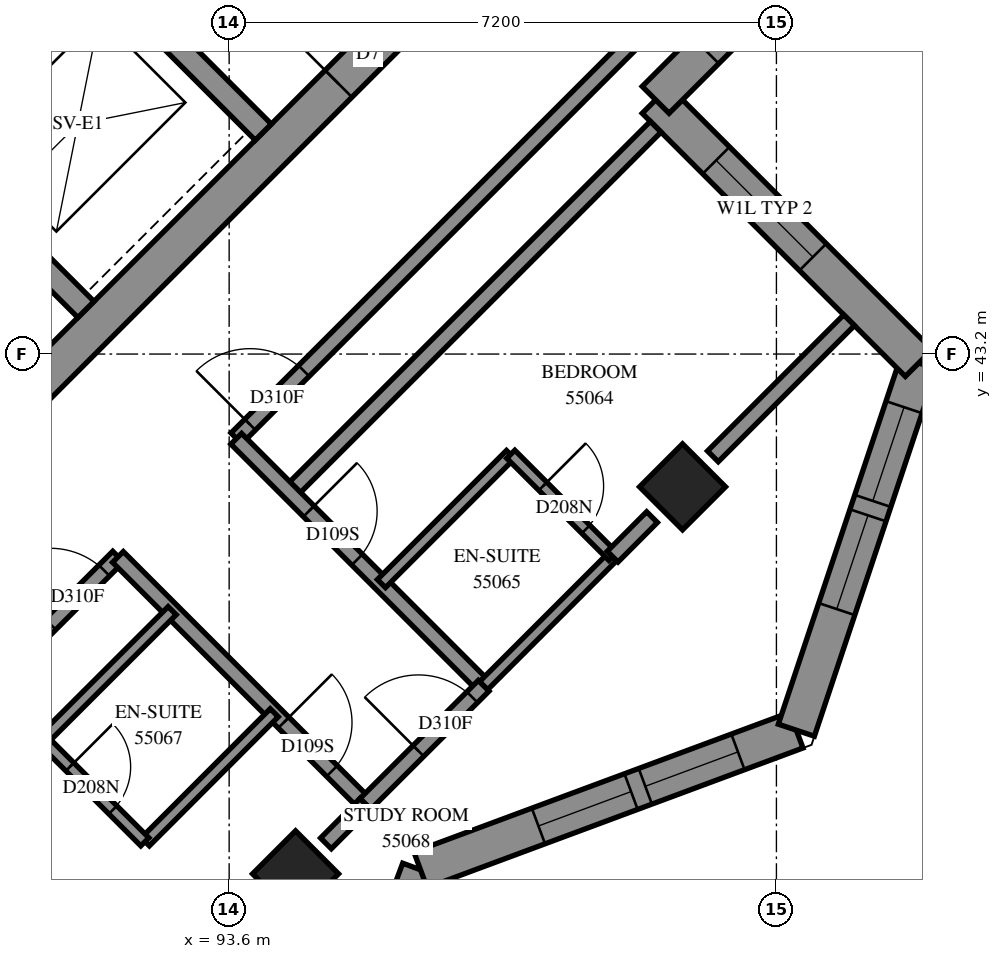
"""IFC4 building model, lengths in metres.
Left out: names, types, materials, properties, quantities, classifications, styles, units other than length and angle.
Written with IfcOpenShell. Run it as: python <this file> out.ifc"""

import sys

from ifc_helpers import new_model, si_unit, direction, frame, frame_2d, origin, origin_2d, place, context, subcontext, project, spatial, polyline, rectangle, outline, extrude, element, fill, save


model = new_model("IFC4")
c1 = context("Model", 3, precision=1e-05, world=origin(), true_north=direction((0.0, 1.0)))
c2 = subcontext(c1, "Body", "Model", "MODEL_VIEW")
j1 = project(units=[si_unit("LENGTHUNIT", "METRE"), si_unit("PLANEANGLEUNIT", "RADIAN")], contexts=[c1])
p1 = place(None, origin())
s1 = spatial("IfcSite", under=j1, at=p1, CompositionType="ELEMENT")
p2 = place(p1, origin())
s2 = spatial("IfcBuilding", under=s1, at=p2, CompositionType="ELEMENT")
p3 = place(p2, frame((0.0, 0.0, 203.2)))
s3 = spatial("IfcBuildingStorey", under=s2, at=p3, CompositionType="ELEMENT", Elevation=203.2)
for number, where, z_axis, x_axis in (
    (1, (99.565, 41.453, 0.0), (0.0, 0.0, 1.0), (0.707, -0.707, 0.0)),
    (2, (94.474, 36.362, 0.0), (0.0, 0.0, 1.0), (0.707, -0.707, 0.0)),
):
    element("IfcColumn", number, at=place(p3, frame(where, z_axis=z_axis, x_axis=x_axis)), inside=s3, PredefinedType="COLUMN", context=c2, shape_type="SweptSolid", body=[
        extrude(rectangle(XDim=0.8, YDim=0.8, at=origin_2d()), origin(), (0.0, 0.0, 1.0), 3.1),
    ])
p4 = place(p3, frame((87.013, 38.731, -0.3), z_axis=(0.0, 0.0, 1.0), x_axis=(0.7071067812, 0.7071067812, 0.0)))
e3 = element("IfcWall", 3, at=p4, inside=s3, PredefinedType="SHEAR", context=c2, shape_type="SweptSolid", body=[
    extrude(rectangle(XDim=14.4, YDim=0.5, at=frame_2d((7.2, 0.0))), origin(), (0.0, 0.0, 1.0), 2.7),
])
p5 = place(p4, frame((4.55, 0.0, 0.3)))
e4 = element("IfcOpeningElement", 4, at=p5, cuts=e3, PredefinedType="OPENING", context=c2, shape_type="SweptSolid", body=[
    extrude(rectangle(XDim=1.1, YDim=2.1, at=frame_2d((0.55, 1.05))), frame((0.0, 0.26, 0.0), z_axis=(0.0, -1.0, 0.0), x_axis=(1.0, 0.0, 0.0)), (0.0, 0.0, 1.0), 0.52),
])
p6 = place(p4, frame((11.35, 0.0, 0.3)))
e5 = element("IfcOpeningElement", 5, at=p6, cuts=e3, PredefinedType="OPENING", context=c2, shape_type="SweptSolid", body=[
    extrude(rectangle(XDim=1.1, YDim=2.1, at=frame_2d((0.55, 1.05))), frame((0.0, 0.26, 0.0), z_axis=(0.0, -1.0, 0.0), x_axis=(1.0, 0.0, 0.0)), (0.0, 0.0, 1.0), 0.52),
])
p7 = place(p3, frame((89.17, 46.332, 0.0), z_axis=(0.0, 0.0, 1.0), x_axis=(0.7071067812, 0.7071067812, 0.0)))
e6 = element("IfcWall", 6, at=p7, inside=s3, PredefinedType="SOLIDWALL", context=c2, shape_type="SweptSolid", body=[
    extrude(rectangle(XDim=3.3, YDim=0.3, at=frame_2d((1.65, 0.0))), origin(), (0.0, 0.0, 1.0), 3.1),
])
p8 = place(p3, frame((81.534, 53.969, 0.0), z_axis=(0.0, 0.0, 1.0), x_axis=(0.707103309, -0.7071102534, 0.0)))
e7 = element("IfcWall", 7, at=p8, inside=s3, PredefinedType="SOLIDWALL", context=c2, shape_type="SweptSolid", body=[
    extrude(rectangle(XDim=14.4, YDim=0.3, at=frame_2d((7.2, 0.0))), origin(), (0.0, 0.0, 1.0), 3.1),
])
p9 = place(p8, frame((1.25, 0.0, 0.0)))
e8 = element("IfcOpeningElement", 8, at=p9, cuts=e7, PredefinedType="OPENING", context=c2, shape_type="SweptSolid", body=[
    extrude(rectangle(XDim=1.1, YDim=2.1, at=frame_2d((0.55, 1.05))), frame((0.0, 0.16, 0.0), z_axis=(0.0, -1.0, 0.0), x_axis=(1.0, 0.0, 0.0)), (0.0, 0.0, 1.0), 0.32),
])
p10 = place(p8, frame((4.85, 0.0, 0.0)))
e9 = element("IfcOpeningElement", 9, at=p10, cuts=e7, PredefinedType="OPENING", context=c2, shape_type="SweptSolid", body=[
    extrude(rectangle(XDim=1.1, YDim=2.1, at=frame_2d((0.55, 1.05))), frame((0.0, 0.16, 0.0), z_axis=(0.0, -1.0, 0.0), x_axis=(1.0, 0.0, 0.0)), (0.0, 0.0, 1.0), 0.32),
])
p11 = place(p8, frame((8.45, 0.0, 0.0)))
e10 = element("IfcOpeningElement", 10, at=p11, cuts=e7, PredefinedType="OPENING", context=c2, shape_type="SweptSolid", body=[
    extrude(rectangle(XDim=1.1, YDim=2.1, at=frame_2d((0.55, 1.05))), frame((0.0, 0.16, 0.0), z_axis=(0.0, -1.0, 0.0), x_axis=(1.0, 0.0, 0.0)), (0.0, 0.0, 1.0), 0.32),
])
p12 = place(p8, frame((12.05, 0.0, 0.0)))
e11 = element("IfcOpeningElement", 11, at=p12, cuts=e7, PredefinedType="OPENING", context=c2, shape_type="SweptSolid", body=[
    extrude(rectangle(XDim=1.1, YDim=2.1, at=frame_2d((0.55, 1.05))), frame((0.0, 0.16, 0.0), z_axis=(0.0, -1.0, 0.0), x_axis=(1.0, 0.0, 0.0)), (0.0, 0.0, 1.0), 0.32),
])
p13 = place(p3, frame((88.958, 51.211, 0.0), z_axis=(0.0, 0.0, 1.0), x_axis=(0.7070998367, -0.7071137256, 0.0)))
e12 = element("IfcWall", 12, at=p13, inside=s3, PredefinedType="SOLIDWALL", context=c2, shape_type="SweptSolid", body=[
    extrude(rectangle(XDim=7.2, YDim=0.3, at=frame_2d((3.6, 0.0))), origin(), (0.0, 0.0, 1.0), 3.1),
])
p14 = place(p3, frame((94.281, 31.47, 0.0), z_axis=(0.0, 0.0, 1.0), x_axis=(0.3481903374, 0.9374238577, 0.0)))
e13 = element("IfcWall", 13, at=p14, inside=s3, PredefinedType="SOLIDWALL", context=c2, shape_type="SweptSolid", body=[
    extrude(outline(polyline([(-0.12, -0.25), (5.16, -0.25), (5.39, 0.25), (0.12, 0.25), (-0.12, -0.25)])), origin(), (0.0, 0.0, 1.0), 3.1),
])
p15 = place(p14, frame((1.512, 0.0, 0.45)))
e14 = element("IfcOpeningElement", 14, at=p15, cuts=e13, PredefinedType="OPENING", context=c2, shape_type="SweptSolid", body=[
    extrude(rectangle(XDim=1.3, YDim=2.5, at=frame_2d((0.65, 1.25))), frame((0.0, 0.26, 0.0), z_axis=(0.0, -1.0, 0.0), x_axis=(1.0, 0.0, 0.0)), (0.0, 0.0, 1.0), 0.52),
])
p16 = place(p14, frame((3.012, 0.0, 0.45)))
e15 = element("IfcOpeningElement", 15, at=p16, cuts=e13, PredefinedType="OPENING", context=c2, shape_type="SweptSolid", body=[
    extrude(rectangle(XDim=1.3, YDim=2.5, at=frame_2d((0.65, 1.25))), frame((0.0, 0.26, 0.0), z_axis=(0.0, -1.0, 0.0), x_axis=(1.0, 0.0, 0.0)), (0.0, 0.0, 1.0), 0.52),
])
p17 = place(p3, frame((96.118, 36.415, 0.0), z_axis=(0.0, 0.0, 1.0), x_axis=(0.9374238577, 0.3481903374, 0.0)))
e16 = element("IfcWall", 16, at=p17, inside=s3, PredefinedType="SOLIDWALL", context=c2, shape_type="SweptSolid", body=[
    extrude(outline(polyline([(0.115, -0.25), (5.395, -0.25), (5.155, 0.25), (-0.115, 0.25), (0.115, -0.25)])), origin(), (0.0, 0.0, 1.0), 3.1),
])
p18 = place(p17, frame((1.655, 0.0, 0.45)))
e17 = element("IfcOpeningElement", 17, at=p18, cuts=e16, PredefinedType="OPENING", context=c2, shape_type="SweptSolid", body=[
    extrude(rectangle(XDim=1.3, YDim=2.5, at=frame_2d((0.65, 1.25))), frame((0.0, 0.26, 0.0), z_axis=(0.0, -1.0, 0.0), x_axis=(1.0, 0.0, 0.0)), (0.0, 0.0, 1.0), 0.52),
])
p19 = place(p17, frame((3.155, 0.0, 0.45)))
e18 = element("IfcOpeningElement", 18, at=p19, cuts=e16, PredefinedType="OPENING", context=c2, shape_type="SweptSolid", body=[
    extrude(rectangle(XDim=1.3, YDim=2.5, at=frame_2d((0.65, 1.25))), frame((0.0, 0.26, 0.0), z_axis=(0.0, -1.0, 0.0), x_axis=(1.0, 0.0, 0.0)), (0.0, 0.0, 1.0), 0.52),
])
p20 = place(p3, frame((101.062, 38.252, 0.0), z_axis=(0.0, 0.0, 1.0), x_axis=(0.3162395484, 0.9486793705, 0.0)))
e19 = element("IfcWall", 19, at=p20, inside=s3, PredefinedType="SOLIDWALL", context=c2, shape_type="SweptSolid", body=[
    extrude(outline(polyline([(-0.12, -0.25), (5.247, -0.25), (4.938, 0.25), (0.12, 0.25), (-0.12, -0.25)])), origin(), (0.0, 0.0, 1.0), 3.1),
])
p21 = place(p20, frame((1.68, 0.0, 0.45)))
e20 = element("IfcOpeningElement", 20, at=p21, cuts=e19, PredefinedType="OPENING", context=c2, shape_type="SweptSolid", body=[
    extrude(rectangle(XDim=1.3, YDim=2.5, at=frame_2d((0.65, 1.25))), frame((0.0, 0.26, 0.0), z_axis=(0.0, -1.0, 0.0), x_axis=(1.0, 0.0, 0.0)), (0.0, 0.0, 1.0), 0.52),
])
p22 = place(p20, frame((3.18, 0.0, 0.45)))
e21 = element("IfcOpeningElement", 21, at=p22, cuts=e19, PredefinedType="OPENING", context=c2, shape_type="SweptSolid", body=[
    extrude(rectangle(XDim=1.3, YDim=2.5, at=frame_2d((0.65, 1.25))), frame((0.0, 0.26, 0.0), z_axis=(0.0, -1.0, 0.0), x_axis=(1.0, 0.0, 0.0)), (0.0, 0.0, 1.0), 0.52),
])
p23 = place(p3, frame((102.673, 43.083, 0.0), z_axis=(0.0, 0.0, 1.0), x_axis=(-0.7071067812, 0.7071067812, 0.0)))
e22 = element("IfcWall", 22, at=p23, inside=s3, PredefinedType="SOLIDWALL", context=c2, shape_type="SweptSolid", body=[
    extrude(outline(polyline([(-0.154, -0.25), (4.646, -0.25), (5.146, 0.25), (0.154, 0.25), (-0.154, -0.25)])), origin(), (0.0, 0.0, 1.0), 3.1),
])
p24 = place(p23, frame((1.97, 0.0, 0.6)))
e23 = element("IfcOpeningElement", 23, at=p24, cuts=e22, PredefinedType="OPENING", context=c2, shape_type="SweptSolid", body=[
    extrude(rectangle(XDim=1.8, YDim=1.9, at=frame_2d((0.9, 0.95))), frame((0.0, 0.26, 0.0), z_axis=(0.0, -1.0, 0.0), x_axis=(1.0, 0.0, 0.0)), (0.0, 0.0, 1.0), 0.52),
])
p25 = place(p3, frame((99.211, 46.544, 0.0), z_axis=(0.0, 0.0, 1.0), x_axis=(0.7071067812, 0.7071067812, 0.0)))
e24 = element("IfcWall", 24, at=p25, inside=s3, PredefinedType="SOLIDWALL", context=c2, shape_type="SweptSolid", body=[
    extrude(outline(polyline([(0.25, -0.25), (6.071, -0.25), (5.395, 0.25), (-0.25, 0.25), (0.25, -0.25)])), origin(), (0.0, 0.0, 1.0), 3.1),
])
p26 = place(p25, frame((0.925, 0.0, 0.6)))
e25 = element("IfcOpeningElement", 25, at=p26, cuts=e24, PredefinedType="OPENING", context=c2, shape_type="SweptSolid", body=[
    extrude(rectangle(XDim=1.8, YDim=1.9, at=frame_2d((0.9, 0.95))), frame((0.0, 0.26, 0.0), z_axis=(0.0, -1.0, 0.0), x_axis=(1.0, 0.0, 0.0)), (0.0, 0.0, 1.0), 0.52),
])
p27 = place(p3, frame((93.695, 42.091, 0.0), z_axis=(0.0, 0.0, 1.0), x_axis=(0.7071067812, 0.7071067812, 0.0)))
e26 = element("IfcWall", 26, at=p27, inside=s3, PredefinedType="PARTITIONING", context=c2, shape_type="SweptSolid", body=[
    extrude(rectangle(XDim=9.899, YDim=0.2, at=frame_2d((4.95, 0.0))), origin(), (0.0, 0.0, 1.0), 3.1),
])
p28 = place(p27, frame((0.255, 0.0, 0.0)))
e27 = element("IfcOpeningElement", 27, at=p28, cuts=e26, PredefinedType="OPENING", context=c2, shape_type="SweptSolid", body=[
    extrude(rectangle(XDim=1.0, YDim=2.1, at=frame_2d((0.5, 1.05))), frame((0.0, 0.11, 0.0), z_axis=(0.0, -1.0, 0.0), x_axis=(1.0, 0.0, 0.0)), (0.0, 0.0, 1.0), 0.22),
])
p29 = place(p3, frame((86.835, 35.231, 0.0), z_axis=(0.0, 0.0, 1.0), x_axis=(0.7071067812, 0.7071067812, 0.0)))
e28 = element("IfcWall", 28, at=p29, inside=s3, PredefinedType="PARTITIONING", context=c2, shape_type="SweptSolid", body=[
    extrude(rectangle(XDim=7.501, YDim=0.2, at=frame_2d((3.751, 0.0))), origin(), (0.0, 0.0, 1.0), 3.1),
])
p30 = place(p29, frame((6.243, 0.0, 0.0)))
e29 = element("IfcOpeningElement", 29, at=p30, cuts=e28, PredefinedType="OPENING", context=c2, shape_type="SweptSolid", body=[
    extrude(rectangle(XDim=1.0, YDim=2.1, at=frame_2d((0.5, 1.05))), frame((0.0, 0.11, 0.0), z_axis=(0.0, -1.0, 0.0), x_axis=(1.0, 0.0, 0.0)), (0.0, 0.0, 1.0), 0.22),
])
p31 = place(p3, frame((94.402, 41.382, 0.0), z_axis=(0.0, 0.0, 1.0), x_axis=(0.7072538072, 0.7069597246, 0.0)))
e30 = element("IfcWall", 30, at=p31, inside=s3, PredefinedType="PARTITIONING", context=c2, shape_type="SweptSolid", body=[
    extrude(rectangle(XDim=6.801, YDim=0.2, at=frame_2d((3.4, 0.0))), origin(), (0.0, 0.0, 1.0), 3.1),
])
p32 = place(p3, frame((93.693, 42.085, 0.0), z_axis=(0.0, 0.0, 1.0), x_axis=(0.7071067812, -0.7071067812, 0.0)))
e31 = element("IfcWall", 31, at=p32, inside=s3, PredefinedType="PARTITIONING", context=c2, shape_type="SweptSolid", body=[
    extrude(rectangle(XDim=4.599, YDim=0.2, at=frame_2d((2.3, 0.0))), origin(), (0.0, 0.0, 1.0), 3.1),
])
p33 = place(p32, frame((1.349, 0.0, 0.0)))
e32 = element("IfcOpeningElement", 32, at=p33, cuts=e31, PredefinedType="OPENING", context=c2, shape_type="SweptSolid", body=[
    extrude(rectangle(XDim=0.9, YDim=2.1, at=frame_2d((0.45, 1.05))), frame((0.0, 0.11, 0.0), z_axis=(0.0, -1.0, 0.0), x_axis=(1.0, 0.0, 0.0)), (0.0, 0.0, 1.0), 0.22),
])
p34 = place(p3, frame((92.137, 40.531, 0.0), z_axis=(0.0, 0.0, 1.0), x_axis=(0.7071067812, -0.7071067812, 0.0)))
e33 = element("IfcWall", 33, at=p34, inside=s3, PredefinedType="PARTITIONING", context=c2, shape_type="SweptSolid", body=[
    extrude(rectangle(XDim=4.599, YDim=0.2, at=frame_2d((2.3, 0.0))), origin(), (0.0, 0.0, 1.0), 3.1),
])
p35 = place(p34, frame((3.083, 0.0, 0.0)))
e34 = element("IfcOpeningElement", 34, at=p35, cuts=e33, PredefinedType="OPENING", context=c2, shape_type="SweptSolid", body=[
    extrude(rectangle(XDim=0.9, YDim=2.1, at=frame_2d((0.45, 1.05))), frame((0.0, 0.11, 0.0), z_axis=(0.0, -1.0, 0.0), x_axis=(1.0, 0.0, 0.0)), (0.0, 0.0, 1.0), 0.22),
])
p36 = place(p3, frame((99.964, 41.854, 0.0), z_axis=(0.0, 0.0, 1.0), x_axis=(0.7071265121, 0.7070870497, 0.0)))
e35 = element("IfcWall", 35, at=p36, inside=s3, PredefinedType="PARTITIONING", context=c2, shape_type="SweptSolid", body=[
    extrude(rectangle(XDim=2.534, YDim=0.2, at=frame_2d((1.267, 0.0))), origin(), (0.0, 0.0, 1.0), 3.1),
])
p37 = place(p3, frame((95.603, 40.181, 0.0), z_axis=(0.0, 0.0, 1.0), x_axis=(0.7071067812, 0.7071067812, 0.0)))
e36 = element("IfcWall", 36, at=p37, inside=s3, PredefinedType="PARTITIONING", context=c2, shape_type="SweptSolid", body=[
    extrude(rectangle(XDim=2.401, YDim=0.15, at=frame_2d((1.201, 0.0))), origin(), (0.0, 0.0, 1.0), 3.1),
])
p38 = place(p3, frame((96.947, 38.837, 0.0), z_axis=(0.0, 0.0, 1.0), x_axis=(0.7071067812, 0.7071067812, 0.0)))
e37 = element("IfcWall", 37, at=p38, inside=s3, PredefinedType="PARTITIONING", context=c2, shape_type="SweptSolid", body=[
    extrude(rectangle(XDim=2.401, YDim=0.15, at=frame_2d((1.201, 0.0))), origin(), (0.0, 0.0, 1.0), 2.6),
])
for number, where, z_axis, x_axis in (
    (38, (91.152, 38.128, 0.0), (0.0, 0.0, 1.0), (0.708, 0.707, 0.0)),
    (39, (92.497, 36.783, 0.0), (0.0, 0.0, 1.0), (0.707, 0.708, 0.0)),
):
    element("IfcWall", number, at=place(p3, frame(where, z_axis=z_axis, x_axis=x_axis)), inside=s3, PredefinedType="PARTITIONING", context=c2, shape_type="SweptSolid", body=[
        extrude(rectangle(XDim=2.4, YDim=0.15, at=frame_2d((1.2, 0.0))), origin(), (0.0, 0.0, 1.0), 3.1),
    ])
p39 = place(p3, frame((95.392, 37.282, 0.0), z_axis=(0.0, 0.0, 1.0), x_axis=(0.7075613659, 0.706651904, 0.0)))
e40 = element("IfcWall", 40, at=p39, inside=s3, PredefinedType="PARTITIONING", context=c2, shape_type="SweptSolid", body=[
    extrude(rectangle(XDim=2.199, YDim=0.2, at=frame_2d((1.1, 0.0))), origin(), (0.0, 0.0, 1.0), 2.6),
])
p40 = place(p39, frame((0.987, 0.0, 0.0)))
e41 = element("IfcOpeningElement", 41, at=p40, cuts=e40, PredefinedType="OPENING", context=c2, shape_type="SweptSolid", body=[
    extrude(rectangle(XDim=1.0, YDim=2.1, at=frame_2d((0.5, 1.05))), frame((0.0, 0.11, 0.0), z_axis=(0.0, -1.0, 0.0), x_axis=(1.0, 0.0, 0.0)), (0.0, 0.0, 1.0), 0.22),
])
p41 = place(p3, frame((97.305, 41.881, 0.0), z_axis=(0.0, 0.0, 1.0), x_axis=(0.7071067812, -0.7071067812, 0.0)))
e42 = element("IfcWall", 42, at=p41, inside=s3, PredefinedType="PARTITIONING", context=c2, shape_type="SweptSolid", body=[
    extrude(rectangle(XDim=1.901, YDim=0.15, at=frame_2d((0.95, 0.0))), origin(), (0.0, 0.0, 1.0), 3.1),
])
p42 = place(p41, frame((0.596, 0.0, 0.0)))
e43 = element("IfcOpeningElement", 43, at=p42, cuts=e42, PredefinedType="OPENING", context=c2, shape_type="SweptSolid", body=[
    extrude(rectangle(XDim=0.8, YDim=2.1, at=frame_2d((0.4, 1.05))), frame((0.0, 0.085, 0.0), z_axis=(0.0, -1.0, 0.0), x_axis=(1.0, 0.0, 0.0)), (0.0, 0.0, 1.0), 0.17),
])
p43 = place(p3, frame((91.147, 38.127, 0.0), z_axis=(0.0, 0.0, 1.0), x_axis=(0.7071067812, -0.7071067812, 0.0)))
e44 = element("IfcWall", 44, at=p43, inside=s3, PredefinedType="PARTITIONING", context=c2, shape_type="SweptSolid", body=[
    extrude(rectangle(XDim=1.901, YDim=0.15, at=frame_2d((0.95, 0.0))), origin(), (0.0, 0.0, 1.0), 3.1),
])
p44 = place(p43, frame((0.506, 0.0, 0.0)))
e45 = element("IfcOpeningElement", 45, at=p44, cuts=e44, PredefinedType="OPENING", context=c2, shape_type="SweptSolid", body=[
    extrude(rectangle(XDim=0.8, YDim=2.1, at=frame_2d((0.4, 1.05))), frame((0.0, 0.085, 0.0), z_axis=(0.0, -1.0, 0.0), x_axis=(1.0, 0.0, 0.0)), (0.0, 0.0, 1.0), 0.17),
])
for number, where, z_axis, x_axis in (
    (46, (98.645, 40.535, 0.0), (0.0, 0.0, 1.0), (0.706, 0.708, 0.0)),
    (47, (94.874, 36.763, 0.0), (0.0, 0.0, 1.0), (0.706, 0.708, 0.0)),
):
    element("IfcWall", number, at=place(p3, frame(where, z_axis=z_axis, x_axis=x_axis)), inside=s3, PredefinedType="PARTITIONING", context=c2, shape_type="SweptSolid", body=[
        extrude(rectangle(XDim=0.734, YDim=0.2, at=frame_2d((0.367, 0.0))), origin(), (0.0, 0.0, 1.0), 2.6),
    ])
p45 = place(p18, origin())
e48 = element("IfcWindow", 48, at=p45, inside=s3, PartitioningType="SINGLE_PANEL", PredefinedType="WINDOW", context=c2, shape_type="SweptSolid", body=[
    extrude(rectangle(XDim=1.3, YDim=2.5, at=frame_2d((0.65, 1.25))), frame((0.0, 0.18, 0.0), z_axis=(0.0, -1.0, 0.0), x_axis=(1.0, 0.0, 0.0)), (0.0, 0.0, 1.0), 0.06),
])
fill(e17, e48)
p46 = place(p19, origin())
e49 = element("IfcWindow", 49, at=p46, inside=s3, PartitioningType="SINGLE_PANEL", PredefinedType="WINDOW", context=c2, shape_type="SweptSolid", body=[
    extrude(rectangle(XDim=1.3, YDim=2.5, at=frame_2d((0.65, 1.25))), frame((0.0, 0.18, 0.0), z_axis=(0.0, -1.0, 0.0), x_axis=(1.0, 0.0, 0.0)), (0.0, 0.0, 1.0), 0.06),
])
fill(e18, e49)
p47 = place(p21, origin())
e50 = element("IfcWindow", 50, at=p47, inside=s3, PartitioningType="SINGLE_PANEL", PredefinedType="WINDOW", context=c2, shape_type="SweptSolid", body=[
    extrude(rectangle(XDim=1.3, YDim=2.5, at=frame_2d((0.65, 1.25))), frame((0.0, 0.18, 0.0), z_axis=(0.0, -1.0, 0.0), x_axis=(1.0, 0.0, 0.0)), (0.0, 0.0, 1.0), 0.06),
])
fill(e20, e50)
p48 = place(p22, origin())
e51 = element("IfcWindow", 51, at=p48, inside=s3, PartitioningType="SINGLE_PANEL", PredefinedType="WINDOW", context=c2, shape_type="SweptSolid", body=[
    extrude(rectangle(XDim=1.3, YDim=2.5, at=frame_2d((0.65, 1.25))), frame((0.0, 0.18, 0.0), z_axis=(0.0, -1.0, 0.0), x_axis=(1.0, 0.0, 0.0)), (0.0, 0.0, 1.0), 0.06),
])
fill(e21, e51)
p49 = place(p24, origin())
e52 = element("IfcWindow", 52, at=p49, inside=s3, PartitioningType="SINGLE_PANEL", PredefinedType="WINDOW", context=c2, shape_type="SweptSolid", body=[
    extrude(rectangle(XDim=1.8, YDim=1.9, at=frame_2d((0.9, 0.95))), frame((0.0, 0.18, 0.0), z_axis=(0.0, -1.0, 0.0), x_axis=(1.0, 0.0, 0.0)), (0.0, 0.0, 1.0), 0.06),
])
fill(e23, e52)
p50 = place(p6, origin())
e53 = element("IfcDoor", 53, at=p50, inside=s3, OperationType="SINGLE_SWING_RIGHT", PredefinedType="DOOR", context=c2, shape_type="SweptSolid", body=[
    extrude(rectangle(XDim=1.1, YDim=2.1, at=frame_2d((0.55, 1.05))), frame((0.0, 0.025, 0.0), z_axis=(0.0, -1.0, 0.0), x_axis=(1.0, 0.0, 0.0)), (0.0, 0.0, 1.0), 0.05),
])
fill(e5, e53)
p51 = place(p28, origin())
e54 = element("IfcDoor", 54, at=p51, inside=s3, OperationType="SINGLE_SWING_LEFT", PredefinedType="DOOR", context=c2, shape_type="SweptSolid", body=[
    extrude(rectangle(XDim=1.0, YDim=2.1, at=frame_2d((0.5, 1.05))), frame((0.0, 0.025, 0.0), z_axis=(0.0, -1.0, 0.0), x_axis=(1.0, 0.0, 0.0)), (0.0, 0.0, 1.0), 0.05),
])
fill(e27, e54)
p52 = place(p30, origin())
e55 = element("IfcDoor", 55, at=p52, inside=s3, OperationType="SINGLE_SWING_RIGHT", PredefinedType="DOOR", context=c2, shape_type="SweptSolid", body=[
    extrude(rectangle(XDim=1.0, YDim=2.1, at=frame_2d((0.5, 1.05))), frame((0.0, 0.025, 0.0), z_axis=(0.0, -1.0, 0.0), x_axis=(1.0, 0.0, 0.0)), (0.0, 0.0, 1.0), 0.05),
])
fill(e29, e55)
p53 = place(p33, origin())
e56 = element("IfcDoor", 56, at=p53, inside=s3, OperationType="SINGLE_SWING_RIGHT", PredefinedType="DOOR", context=c2, shape_type="SweptSolid", body=[
    extrude(rectangle(XDim=0.9, YDim=2.1, at=frame_2d((0.45, 1.05))), frame((0.0, 0.025, 0.0), z_axis=(0.0, -1.0, 0.0), x_axis=(1.0, 0.0, 0.0)), (0.0, 0.0, 1.0), 0.05),
])
fill(e32, e56)
p54 = place(p42, origin())
e57 = element("IfcDoor", 57, at=p54, inside=s3, OperationType="SINGLE_SWING_RIGHT", PredefinedType="DOOR", context=c2, shape_type="SweptSolid", body=[
    extrude(rectangle(XDim=0.8, YDim=2.1, at=frame_2d((0.4, 1.05))), frame((0.0, 0.025, 0.0), z_axis=(0.0, -1.0, 0.0), x_axis=(1.0, 0.0, 0.0)), (0.0, 0.0, 1.0), 0.05),
])
fill(e43, e57)
p55 = place(p35, origin())
e58 = element("IfcDoor", 58, at=p55, inside=s3, OperationType="SINGLE_SWING_LEFT", PredefinedType="DOOR", context=c2, shape_type="SweptSolid", body=[
    extrude(rectangle(XDim=0.9, YDim=2.1, at=frame_2d((0.45, 1.05))), frame((0.0, 0.025, 0.0), z_axis=(0.0, -1.0, 0.0), x_axis=(1.0, 0.0, 0.0)), (0.0, 0.0, 1.0), 0.05),
])
fill(e34, e58)
p56 = place(p44, origin())
e59 = element("IfcDoor", 59, at=p56, inside=s3, OperationType="SINGLE_SWING_RIGHT", PredefinedType="DOOR", context=c2, shape_type="SweptSolid", body=[
    extrude(rectangle(XDim=0.8, YDim=2.1, at=frame_2d((0.4, 1.05))), frame((0.0, 0.025, 0.0), z_axis=(0.0, -1.0, 0.0), x_axis=(1.0, 0.0, 0.0)), (0.0, 0.0, 1.0), 0.05),
])
fill(e45, e59)
p57 = place(p40, origin())
e60 = element("IfcDoor", 60, at=p57, inside=s3, OperationType="SINGLE_SWING_RIGHT", PredefinedType="DOOR", context=c2, shape_type="SweptSolid", body=[
    extrude(rectangle(XDim=1.0, YDim=2.1, at=frame_2d((0.5, 1.05))), frame((0.0, 0.025, 0.0), z_axis=(0.0, -1.0, 0.0), x_axis=(1.0, 0.0, 0.0)), (0.0, 0.0, 1.0), 0.05),
])
fill(e41, e60)
save(model, sys.argv[1])
